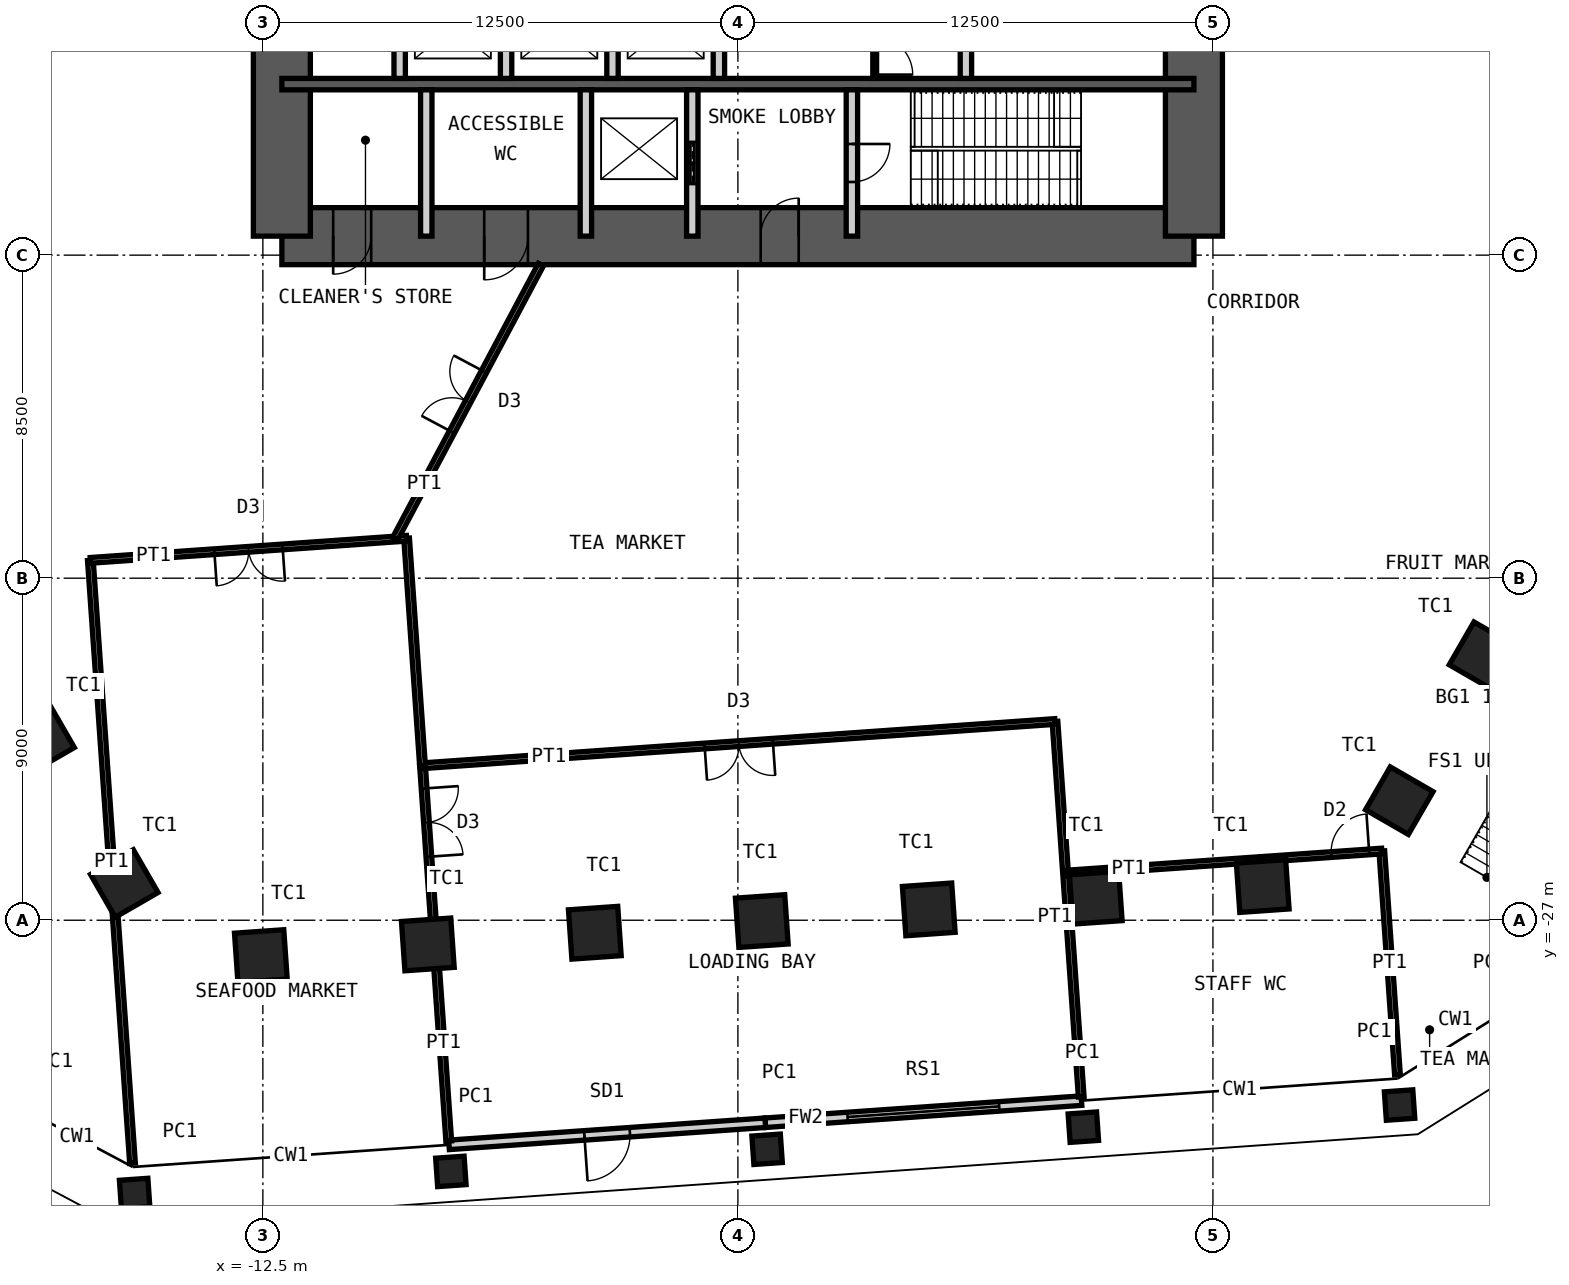
"""IFC4 building model, lengths in metres.
Left out: names, types, materials, properties, quantities, classifications, styles, units other than length and angle.
Written with IfcOpenShell. Run it as: python <this file> out.ifc"""

import sys

from ifc_helpers import new_model, si_unit, direction, frame, frame_2d, origin, origin_2d, place, context, subcontext, project, spatial, rectangle, hollow_rectangle, extrude, element, fill, save


model = new_model("IFC4")
c1 = context("Model", 3, precision=1e-05, world=origin(), true_north=direction((0.0, 1.0)))
c2 = subcontext(c1, "Body", "Model", "MODEL_VIEW")
j1 = project(units=[si_unit("LENGTHUNIT", "METRE"), si_unit("PLANEANGLEUNIT", "RADIAN")], contexts=[c1])
p1 = place(None, origin())
s1 = spatial("IfcSite", under=j1, at=p1, CompositionType="ELEMENT")
p2 = place(p1, origin())
s2 = spatial("IfcBuilding", under=s1, at=p2, CompositionType="ELEMENT")
p3 = place(p2, origin())
s3 = spatial("IfcBuildingStorey", under=s2, at=p3, CompositionType="ELEMENT", Elevation=0.0)
for number, where, z_axis, x_axis in (
    (1, (19.607, -20.04, 0.0), (0.0, 0.0, 1.0), (0.5, 0.866, 0.0)),
    (2, (17.405, -23.854, 0.0), (0.0, 0.0, 1.0), (0.5, 0.866, 0.0)),
    (3, (13.811, -26.1, 0.0), (0.0, 0.0, 1.0), (0.998, 0.07, 0.0)),
    (4, (9.417, -26.407, 0.0), (0.0, 0.0, 1.0), (0.998, 0.07, 0.0)),
    (5, (5.023, -26.715, 0.0), (0.0, 0.0, 1.0), (0.998, 0.07, 0.0)),
    (6, (0.629, -27.022, 0.0), (0.0, 0.0, 1.0), (0.998, 0.07, 0.0)),
    (7, (-3.765, -27.329, 0.0), (0.0, 0.0, 1.0), (0.998, 0.07, 0.0)),
    (8, (-8.159, -27.636, 0.0), (0.0, 0.0, 1.0), (0.998, 0.07, 0.0)),
    (9, (-12.553, -27.944, 0.0), (0.0, 0.0, 1.0), (0.998, 0.07, 0.0)),
    (10, (-16.147, -26.033, 0.0), (0.0, 0.0, 1.0), (0.5, -0.866, 0.0)),
    (11, (-18.349, -22.218, 0.0), (0.0, 0.0, 1.0), (0.5, -0.866, 0.0)),
):
    element("IfcColumn", number, at=place(p3, frame(where, z_axis=z_axis, x_axis=x_axis)), inside=s3, PredefinedType="COLUMN", context=c2, shape_type="SweptSolid", body=[
        extrude(hollow_rectangle(XDim=1.3, YDim=1.3, WallThickness=0.1, at=origin_2d()), origin(), (0.0, 0.0, 1.0), 6.0),
    ])
for number, where, z_axis, x_axis in (
    (12, (17.411, -31.863, 0.0), (0.0, 0.0, 1.0), (0.998, 0.07, 0.0)),
    (13, (9.09, -32.445, 0.0), (0.0, 0.0, 1.0), (0.998, 0.07, 0.0)),
    (14, (0.769, -33.027, 0.0), (0.0, 0.0, 1.0), (0.998, 0.07, 0.0)),
    (15, (-7.553, -33.609, 0.0), (0.0, 0.0, 1.0), (0.998, 0.07, 0.0)),
    (16, (-15.874, -34.191, 0.0), (0.0, 0.0, 1.0), (0.998, 0.07, 0.0)),
):
    element("IfcColumn", number, at=place(p3, frame(where, z_axis=z_axis, x_axis=x_axis)), inside=s3, PredefinedType="COLUMN", context=c2, shape_type="SweptSolid", body=[
        extrude(hollow_rectangle(XDim=0.75, YDim=0.75, WallThickness=0.036, at=origin_2d()), origin(), (0.0, 0.0, 1.0), 6.0),
    ])
p4 = place(p3, frame((-12.0, -9.0, 0.0), z_axis=(0.0, 0.0, 1.0), x_axis=(1.0, 0.0, 0.0)))
e17 = element("IfcWall", 17, at=p4, inside=s3, PredefinedType="SHEAR", context=c2, shape_type="SweptSolid", body=[
    extrude(rectangle(XDim=24.0, YDim=1.5, at=frame_2d((12.0, 0.0))), origin(), (0.0, 0.0, 1.0), 6.0),
])
p5 = place(p4, frame((1.35, 0.0, 0.0)))
e18 = element("IfcOpeningElement", 18, at=p5, cuts=e17, PredefinedType="OPENING", context=c2, shape_type="SweptSolid", body=[
    extrude(rectangle(XDim=1.0, YDim=2.1, at=frame_2d((0.5, 1.05))), frame((0.0, 0.76, 0.0), z_axis=(0.0, -1.0, 0.0), x_axis=(1.0, 0.0, 0.0)), (0.0, 0.0, 1.0), 1.52),
])
p6 = place(p4, frame((5.325, 0.0, 0.0)))
e19 = element("IfcOpeningElement", 19, at=p6, cuts=e17, PredefinedType="OPENING", context=c2, shape_type="SweptSolid", body=[
    extrude(rectangle(XDim=1.15, YDim=2.1, at=frame_2d((0.575, 1.05))), frame((0.0, 0.76, 0.0), z_axis=(0.0, -1.0, 0.0), x_axis=(1.0, 0.0, 0.0)), (0.0, 0.0, 1.0), 1.52),
])
p7 = place(p4, frame((12.6, 0.0, 0.0)))
e20 = element("IfcOpeningElement", 20, at=p7, cuts=e17, PredefinedType="OPENING", context=c2, shape_type="SweptSolid", body=[
    extrude(rectangle(XDim=1.0, YDim=2.1, at=frame_2d((0.5, 1.05))), frame((0.0, 0.76, 0.0), z_axis=(0.0, -1.0, 0.0), x_axis=(1.0, 0.0, 0.0)), (0.0, 0.0, 1.0), 1.52),
])
p8 = place(p3, frame((12.0, -9.0, 0.0), z_axis=(0.0, 0.0, 1.0), x_axis=(0.0, 1.0, 0.0)))
e21 = element("IfcWall", 21, at=p8, inside=s3, PredefinedType="SHEAR", context=c2, shape_type="SweptSolid", body=[
    extrude(rectangle(XDim=18.0, YDim=1.5, at=frame_2d((9.0, 0.0))), origin(), (0.0, 0.0, 1.0), 6.0),
])
p9 = place(p8, frame((8.1, 0.0, 0.0)))
e22 = element("IfcOpeningElement", 22, at=p9, cuts=e21, PredefinedType="OPENING", context=c2, shape_type="SweptSolid", body=[
    extrude(rectangle(XDim=1.8, YDim=2.1, at=frame_2d((0.9, 1.05))), frame((0.0, 0.76, 0.0), z_axis=(0.0, -1.0, 0.0), x_axis=(1.0, 0.0, 0.0)), (0.0, 0.0, 1.0), 1.52),
])
p10 = place(p3, frame((-12.0, -9.0, 0.0), z_axis=(0.0, 0.0, 1.0), x_axis=(0.0, 1.0, 0.0)))
e23 = element("IfcWall", 23, at=p10, inside=s3, PredefinedType="SHEAR", context=c2, shape_type="SweptSolid", body=[
    extrude(rectangle(XDim=18.0, YDim=1.5, at=frame_2d((9.0, 0.0))), origin(), (0.0, 0.0, 1.0), 6.0),
])
p11 = place(p10, frame((8.1, 0.0, 0.0)))
e24 = element("IfcOpeningElement", 24, at=p11, cuts=e23, PredefinedType="OPENING", context=c2, shape_type="SweptSolid", body=[
    extrude(rectangle(XDim=1.8, YDim=2.1, at=frame_2d((0.9, 1.05))), frame((0.0, 0.76, 0.0), z_axis=(0.0, -1.0, 0.0), x_axis=(1.0, 0.0, 0.0)), (0.0, 0.0, 1.0), 1.52),
])
p12 = place(p3, frame((-12.0, -5.0, 0.0), z_axis=(0.0, 0.0, 1.0), x_axis=(1.0, 0.0, 0.0)))
e25 = element("IfcWall", 25, at=p12, inside=s3, PredefinedType="SHEAR", context=c2, shape_type="SweptSolid", body=[
    extrude(rectangle(XDim=24.0, YDim=0.3, at=frame_2d((12.0, 0.0))), origin(), (0.0, 0.0, 1.0), 6.0),
])
for number, where, z_axis, x_axis in (
    (26, (-8.9, -4.85, 0.0), (0.0, 0.0, 1.0), (0.0, 1.0, 0.0)),
    (27, (-6.1, -4.85, 0.0), (0.0, 0.0, 1.0), (0.0, 1.0, 0.0)),
    (28, (-3.3, -4.85, 0.0), (0.0, 0.0, 1.0), (0.0, 1.0, 0.0)),
    (29, (-0.5, -4.85, 0.0), (0.0, 0.0, 1.0), (0.0, 1.0, 0.0)),
    (30, (6.0, -4.85, 0.0), (0.0, 0.0, 1.0), (0.0, 1.0, 0.0)),
):
    element("IfcWall", number, at=place(p3, frame(where, z_axis=z_axis, x_axis=x_axis)), inside=s3, PredefinedType="PARTITIONING", context=c2, shape_type="SweptSolid", body=[
        extrude(rectangle(XDim=2.65, YDim=0.3, at=frame_2d((1.325, 0.0))), origin(), (0.0, 0.0, 1.0), 5.78),
    ])
for number, where, z_axis, x_axis in (
    (31, (-8.2, -9.0, 0.0), (0.0, 0.0, 1.0), (0.0, 1.0, 0.0)),
    (32, (-4.0, -9.0, 0.0), (0.0, 0.0, 1.0), (0.0, 1.0, 0.0)),
):
    element("IfcWall", number, at=place(p3, frame(where, z_axis=z_axis, x_axis=x_axis)), inside=s3, PredefinedType="PARTITIONING", context=c2, shape_type="SweptSolid", body=[
        extrude(rectangle(XDim=3.85, YDim=0.3, at=frame_2d((1.925, 0.0))), origin(), (0.0, 0.0, 1.0), 5.78),
    ])
p13 = place(p3, frame((-1.2, -9.0, 0.0), z_axis=(0.0, 0.0, 1.0), x_axis=(0.0, 1.0, 0.0)))
e33 = element("IfcWall", 33, at=p13, inside=s3, PredefinedType="PARTITIONING", context=c2, shape_type="SweptSolid", body=[
    extrude(rectangle(XDim=3.85, YDim=0.3, at=frame_2d((1.925, 0.0))), origin(), (0.0, 0.0, 1.0), 5.78),
])
p14 = place(p13, frame((1.375, 0.0, 0.0)))
e34 = element("IfcOpeningElement", 34, at=p14, cuts=e33, PredefinedType="OPENING", context=c2, shape_type="SweptSolid", body=[
    extrude(rectangle(XDim=1.1, YDim=2.4, at=frame_2d((0.55, 1.2))), frame((0.0, 0.16, 0.0), z_axis=(0.0, -1.0, 0.0), x_axis=(1.0, 0.0, 0.0)), (0.0, 0.0, 1.0), 0.32),
])
p15 = place(p3, frame((3.0, -9.0, 0.0), z_axis=(0.0, 0.0, 1.0), x_axis=(0.0, 1.0, 0.0)))
e35 = element("IfcWall", 35, at=p15, inside=s3, PredefinedType="PARTITIONING", context=c2, shape_type="SweptSolid", body=[
    extrude(rectangle(XDim=3.85, YDim=0.3, at=frame_2d((1.925, 0.0))), origin(), (0.0, 0.0, 1.0), 5.78),
])
p16 = place(p15, frame((1.425, 0.0, 0.0)))
e36 = element("IfcOpeningElement", 36, at=p16, cuts=e35, PredefinedType="OPENING", context=c2, shape_type="SweptSolid", body=[
    extrude(rectangle(XDim=1.0, YDim=2.1, at=frame_2d((0.5, 1.05))), frame((0.0, 0.16, 0.0), z_axis=(0.0, -1.0, 0.0), x_axis=(1.0, 0.0, 0.0)), (0.0, 0.0, 1.0), 0.32),
])
p17 = place(p3, frame((9.041, -31.747, 0.0), z_axis=(0.0, 0.0, 1.0), x_axis=(-0.99756294098, -0.069772335376, 0.0)))
e37 = element("IfcWall", 37, at=p17, inside=s3, PredefinedType="SOLIDWALL", context=c2, shape_type="SweptSolid", body=[
    extrude(rectangle(XDim=8.342, YDim=0.25, at=frame_2d((4.171, 0.0))), origin(), (0.0, 0.0, 1.0), 5.75),
])
p18 = place(p17, frame((2.171, 0.0, 0.0)))
e38 = element("IfcOpeningElement", 38, at=p18, cuts=e37, PredefinedType="OPENING", context=c2, shape_type="SweptSolid", body=[
    extrude(rectangle(XDim=4.0, YDim=4.5, at=frame_2d((2.0, 2.25))), frame((0.0, 0.135, 0.0), z_axis=(0.0, -1.0, 0.0), x_axis=(1.0, 0.0, 0.0)), (0.0, 0.0, 1.0), 0.27),
])
p19 = place(p3, frame((0.72, -32.329, 0.0), z_axis=(0.0, 0.0, 1.0), x_axis=(-0.997564977604, -0.069743210844, 0.0)))
e39 = element("IfcWall", 39, at=p19, inside=s3, PredefinedType="SOLIDWALL", context=c2, shape_type="SweptSolid", body=[
    extrude(rectangle(XDim=8.342, YDim=0.25, at=frame_2d((4.171, 0.0))), origin(), (0.0, 0.0, 1.0), 5.75),
])
p20 = place(p19, frame((3.571, 0.0, 0.0)))
e40 = element("IfcOpeningElement", 40, at=p20, cuts=e39, PredefinedType="OPENING", context=c2, shape_type="SweptSolid", body=[
    extrude(rectangle(XDim=1.2, YDim=2.1, at=frame_2d((0.6, 1.05))), frame((0.0, 0.135, 0.0), z_axis=(0.0, -1.0, 0.0), x_axis=(1.0, 0.0, 0.0)), (0.0, 0.0, 1.0), 0.27),
])
p21 = place(p3, frame((3.6, -4.85, 0.0), z_axis=(0.0, 0.0, 1.0), x_axis=(0.0, 1.0, 0.0)))
e41 = element("IfcWall", 41, at=p21, inside=s3, PredefinedType="PARTITIONING", context=c2, shape_type="SweptSolid", body=[
    extrude(rectangle(XDim=2.65, YDim=0.1, at=frame_2d((1.325, 0.0))), origin(), (0.0, 0.0, 1.0), 5.78),
])
p22 = place(p21, frame((0.1, 0.0, 0.0)))
e42 = element("IfcOpeningElement", 42, at=p22, cuts=e41, PredefinedType="OPENING", context=c2, shape_type="SweptSolid", body=[
    extrude(rectangle(XDim=1.0, YDim=2.4, at=frame_2d((0.5, 1.2))), frame((0.0, 0.06, 0.0), z_axis=(0.0, -1.0, 0.0), x_axis=(1.0, 0.0, 0.0)), (0.0, 0.0, 1.0), 0.12),
])
p23 = place(p3, frame((9.034, -31.647, 0.0), z_axis=(0.0, 0.0, 1.0), x_axis=(-0.069739801019, 0.99756521599, 0.0)))
e43 = element("IfcWall", 43, at=p23, inside=s3, PredefinedType="PARTITIONING", context=c2, shape_type="SweptSolid", body=[
    extrude(rectangle(XDim=9.9, YDim=0.15, at=frame_2d((4.95, 0.0))), origin(), (0.0, 0.0, 1.0), 4.65),
])
p24 = place(p3, frame((-7.609, -32.811, 0.0), z_axis=(0.0, 0.0, 1.0), x_axis=(-0.069764341483, 0.997563500063, 0.0)))
e44 = element("IfcWall", 44, at=p24, inside=s3, PredefinedType="PARTITIONING", context=c2, shape_type="SweptSolid", body=[
    extrude(rectangle(XDim=9.9, YDim=0.15, at=frame_2d((4.95, 0.0))), origin(), (0.0, 0.0, 1.0), 5.75),
])
p25 = place(p24, frame((7.5, 0.0, 0.0)))
e45 = element("IfcOpeningElement", 45, at=p25, cuts=e44, PredefinedType="OPENING", context=c2, shape_type="SweptSolid", body=[
    extrude(rectangle(XDim=1.8, YDim=2.4, at=frame_2d((0.9, 1.2))), frame((0.0, 0.085, 0.0), z_axis=(0.0, -1.0, 0.0), x_axis=(1.0, 0.0, 0.0)), (0.0, 0.0, 1.0), 0.17),
])
p26 = place(p3, frame((8.344, -21.771, 0.0), z_axis=(0.0, 0.0, 1.0), x_axis=(-0.997563959397, -0.069757773133, 0.0)))
e46 = element("IfcWall", 46, at=p26, inside=s3, PredefinedType="PARTITIONING", context=c2, shape_type="SweptSolid", body=[
    extrude(rectangle(XDim=16.684, YDim=0.15, at=frame_2d((8.342, 0.0))), origin(), (0.0, 0.0, 1.0), 5.75),
])
p27 = place(p26, frame((7.442, 0.0, 0.0)))
e47 = element("IfcOpeningElement", 47, at=p27, cuts=e46, PredefinedType="OPENING", context=c2, shape_type="SweptSolid", body=[
    extrude(rectangle(XDim=1.8, YDim=2.4, at=frame_2d((0.9, 1.2))), frame((0.0, 0.085, 0.0), z_axis=(0.0, -1.0, 0.0), x_axis=(1.0, 0.0, 0.0)), (0.0, 0.0, 1.0), 0.17),
])
p28 = place(p3, frame((17.356, -31.065, 0.0), z_axis=(0.0, 0.0, 1.0), x_axis=(-0.069767771051, 0.997563260211, 0.0)))
e48 = element("IfcWall", 48, at=p28, inside=s3, PredefinedType="PARTITIONING", context=c2, shape_type="SweptSolid", body=[
    extrude(rectangle(XDim=5.9, YDim=0.15, at=frame_2d((2.95, 0.0))), origin(), (0.0, 0.0, 1.0), 5.75),
])
p29 = place(p3, frame((16.944, -25.179, 0.0), z_axis=(0.0, 0.0, 1.0), x_axis=(-0.997564977604, -0.069743210844, 0.0)))
e49 = element("IfcWall", 49, at=p29, inside=s3, PredefinedType="PARTITIONING", context=c2, shape_type="SweptSolid", body=[
    extrude(rectangle(XDim=8.342, YDim=0.15, at=frame_2d((4.171, 0.0))), origin(), (0.0, 0.0, 1.0), 5.75),
])
p30 = place(p29, frame((0.334, 0.0, 0.0)))
e50 = element("IfcOpeningElement", 50, at=p30, cuts=e49, PredefinedType="OPENING", context=c2, shape_type="SweptSolid", body=[
    extrude(rectangle(XDim=1.0, YDim=2.4, at=frame_2d((0.5, 1.2))), frame((0.0, 0.085, 0.0), z_axis=(0.0, -1.0, 0.0), x_axis=(1.0, 0.0, 0.0)), (0.0, 0.0, 1.0), 0.17),
])
p31 = place(p3, frame((-8.299, -22.935, 0.0), z_axis=(0.0, 0.0, 1.0), x_axis=(-0.069743284499, 0.997564972454, 0.0)))
e51 = element("IfcWall", 51, at=p31, inside=s3, PredefinedType="PARTITIONING", context=c2, shape_type="SweptSolid", body=[
    extrude(rectangle(XDim=6.0, YDim=0.15, at=frame_2d((3.0, 0.0))), origin(), (0.0, 0.0, 1.0), 5.75),
])
p32 = place(p3, frame((-15.93, -33.393, 0.0), z_axis=(0.0, 0.0, 1.0), x_axis=(-0.069756395536, 0.997564055729, 0.0)))
e52 = element("IfcWall", 52, at=p32, inside=s3, PredefinedType="PARTITIONING", context=c2, shape_type="SweptSolid", body=[
    extrude(rectangle(XDim=15.9, YDim=0.15, at=frame_2d((7.95, 0.0))), origin(), (0.0, 0.0, 1.0), 5.75),
])
p33 = place(p3, frame((-8.718, -16.949, 0.0), z_axis=(0.0, 0.0, 1.0), x_axis=(-0.997564977604, -0.069743210844, 0.0)))
e53 = element("IfcWall", 53, at=p33, inside=s3, PredefinedType="PARTITIONING", context=c2, shape_type="SweptSolid", body=[
    extrude(rectangle(XDim=8.342, YDim=0.15, at=frame_2d((4.171, 0.0))), origin(), (0.0, 0.0, 1.0), 5.75),
])
p34 = place(p33, frame((3.271, 0.0, 0.0)))
e54 = element("IfcOpeningElement", 54, at=p34, cuts=e53, PredefinedType="OPENING", context=c2, shape_type="SweptSolid", body=[
    extrude(rectangle(XDim=1.8, YDim=2.4, at=frame_2d((0.9, 1.2))), frame((0.0, 0.085, 0.0), z_axis=(0.0, -1.0, 0.0), x_axis=(1.0, 0.0, 0.0)), (0.0, 0.0, 1.0), 0.17),
])
p35 = place(p3, frame((-5.184, -9.75, 0.0), z_axis=(0.0, 0.0, 1.0), x_axis=(-0.469479196043, -0.882943534142, 0.0)))
e55 = element("IfcWall", 55, at=p35, inside=s3, PredefinedType="PARTITIONING", context=c2, shape_type="SweptSolid", body=[
    extrude(rectangle(XDim=8.172, YDim=0.15, at=frame_2d((4.086, 0.0))), origin(), (0.0, 0.0, 1.0), 5.75),
])
p36 = place(p35, frame((3.186, 0.0, 0.0)))
e56 = element("IfcOpeningElement", 56, at=p36, cuts=e55, PredefinedType="OPENING", context=c2, shape_type="SweptSolid", body=[
    extrude(rectangle(XDim=1.8, YDim=2.4, at=frame_2d((0.9, 1.2))), frame((0.0, 0.085, 0.0), z_axis=(0.0, -1.0, 0.0), x_axis=(1.0, 0.0, 0.0)), (0.0, 0.0, 1.0), 0.17),
])
p37 = place(p18, origin())
e57 = element("IfcDoor", 57, at=p37, inside=s3, OperationType="ROLLINGUP", PredefinedType="DOOR", context=c2, shape_type="SweptSolid", body=[
    extrude(rectangle(XDim=4.0, YDim=4.5, at=frame_2d((2.0, 2.25))), frame((0.0, 0.025, 0.0), z_axis=(0.0, -1.0, 0.0), x_axis=(1.0, 0.0, 0.0)), (0.0, 0.0, 1.0), 0.05),
])
fill(e38, e57)
p38 = place(p20, origin())
e58 = element("IfcDoor", 58, at=p38, inside=s3, OperationType="SINGLE_SWING_LEFT", PredefinedType="DOOR", context=c2, shape_type="SweptSolid", body=[
    extrude(rectangle(XDim=1.2, YDim=2.1, at=frame_2d((0.6, 1.05))), frame((0.0, 0.025, 0.0), z_axis=(0.0, -1.0, 0.0), x_axis=(1.0, 0.0, 0.0)), (0.0, 0.0, 1.0), 0.05),
])
fill(e40, e58)
p39 = place(p5, origin())
e59 = element("IfcDoor", 59, at=p39, inside=s3, OperationType="SINGLE_SWING_LEFT", PredefinedType="DOOR", context=c2, shape_type="SweptSolid", body=[
    extrude(rectangle(XDim=1.0, YDim=2.1, at=frame_2d((0.5, 1.05))), frame((0.0, 0.025, 0.0), z_axis=(0.0, -1.0, 0.0), x_axis=(1.0, 0.0, 0.0)), (0.0, 0.0, 1.0), 0.05),
])
fill(e18, e59)
p40 = place(p6, origin())
e60 = element("IfcDoor", 60, at=p40, inside=s3, OperationType="SINGLE_SWING_LEFT", PredefinedType="DOOR", context=c2, shape_type="SweptSolid", body=[
    extrude(rectangle(XDim=1.15, YDim=2.1, at=frame_2d((0.575, 1.05))), frame((0.0, 0.025, 0.0), z_axis=(0.0, -1.0, 0.0), x_axis=(1.0, 0.0, 0.0)), (0.0, 0.0, 1.0), 0.05),
])
fill(e19, e60)
p41 = place(p7, origin())
e61 = element("IfcDoor", 61, at=p41, inside=s3, OperationType="SINGLE_SWING_LEFT", PredefinedType="DOOR", context=c2, shape_type="SweptSolid", body=[
    extrude(rectangle(XDim=1.0, YDim=2.1, at=frame_2d((0.5, 1.05))), frame((0.0, 0.025, 0.0), z_axis=(0.0, -1.0, 0.0), x_axis=(1.0, 0.0, 0.0)), (0.0, 0.0, 1.0), 0.05),
])
fill(e20, e61)
p42 = place(p16, origin())
e62 = element("IfcDoor", 62, at=p42, inside=s3, OperationType="SINGLE_SWING_RIGHT", PredefinedType="DOOR", context=c2, shape_type="SweptSolid", body=[
    extrude(rectangle(XDim=1.0, YDim=2.1, at=frame_2d((0.5, 1.05))), frame((0.0, 0.025, 0.0), z_axis=(0.0, -1.0, 0.0), x_axis=(1.0, 0.0, 0.0)), (0.0, 0.0, 1.0), 0.05),
])
fill(e36, e62)
p43 = place(p14, origin())
e63 = element("IfcDoor", 63, at=p43, inside=s3, OperationType="DOUBLE_DOOR_SLIDING", PredefinedType="DOOR", context=c2, shape_type="SweptSolid", body=[
    extrude(rectangle(XDim=1.1, YDim=2.4, at=frame_2d((0.55, 1.2))), frame((0.0, 0.025, 0.0), z_axis=(0.0, -1.0, 0.0), x_axis=(1.0, 0.0, 0.0)), (0.0, 0.0, 1.0), 0.05),
])
fill(e34, e63)
p44 = place(p22, origin())
e64 = element("IfcDoor", 64, at=p44, inside=s3, OperationType="SINGLE_SWING_LEFT", PredefinedType="DOOR", context=c2, shape_type="SweptSolid", body=[
    extrude(rectangle(XDim=1.0, YDim=2.4, at=frame_2d((0.5, 1.2))), frame((0.0, 0.025, 0.0), z_axis=(0.0, -1.0, 0.0), x_axis=(1.0, 0.0, 0.0)), (0.0, 0.0, 1.0), 0.05),
])
fill(e42, e64)
p45 = place(p25, origin())
e65 = element("IfcDoor", 65, at=p45, inside=s3, OperationType="DOUBLE_DOOR_DOUBLE_SWING", PredefinedType="DOOR", context=c2, shape_type="SweptSolid", body=[
    extrude(rectangle(XDim=1.8, YDim=2.4, at=frame_2d((0.9, 1.2))), frame((0.0, 0.025, 0.0), z_axis=(0.0, -1.0, 0.0), x_axis=(1.0, 0.0, 0.0)), (0.0, 0.0, 1.0), 0.05),
])
fill(e45, e65)
p46 = place(p27, origin())
e66 = element("IfcDoor", 66, at=p46, inside=s3, OperationType="DOUBLE_DOOR_DOUBLE_SWING", PredefinedType="DOOR", context=c2, shape_type="SweptSolid", body=[
    extrude(rectangle(XDim=1.8, YDim=2.4, at=frame_2d((0.9, 1.2))), frame((0.0, 0.025, 0.0), z_axis=(0.0, -1.0, 0.0), x_axis=(1.0, 0.0, 0.0)), (0.0, 0.0, 1.0), 0.05),
])
fill(e47, e66)
p47 = place(p30, origin())
e67 = element("IfcDoor", 67, at=p47, inside=s3, OperationType="SINGLE_SWING_LEFT", PredefinedType="DOOR", context=c2, shape_type="SweptSolid", body=[
    extrude(rectangle(XDim=1.0, YDim=2.4, at=frame_2d((0.5, 1.2))), frame((0.0, 0.025, 0.0), z_axis=(0.0, -1.0, 0.0), x_axis=(1.0, 0.0, 0.0)), (0.0, 0.0, 1.0), 0.05),
])
fill(e50, e67)
p48 = place(p34, origin())
e68 = element("IfcDoor", 68, at=p48, inside=s3, OperationType="DOUBLE_DOOR_DOUBLE_SWING", PredefinedType="DOOR", context=c2, shape_type="SweptSolid", body=[
    extrude(rectangle(XDim=1.8, YDim=2.4, at=frame_2d((0.9, 1.2))), frame((0.0, 0.025, 0.0), z_axis=(0.0, -1.0, 0.0), x_axis=(1.0, 0.0, 0.0)), (0.0, 0.0, 1.0), 0.05),
])
fill(e54, e68)
p49 = place(p36, origin())
e69 = element("IfcDoor", 69, at=p49, inside=s3, OperationType="DOUBLE_DOOR_DOUBLE_SWING", PredefinedType="DOOR", context=c2, shape_type="SweptSolid", body=[
    extrude(rectangle(XDim=1.8, YDim=2.4, at=frame_2d((0.9, 1.2))), frame((0.0, 0.025, 0.0), z_axis=(0.0, -1.0, 0.0), x_axis=(1.0, 0.0, 0.0)), (0.0, 0.0, 1.0), 0.05),
])
fill(e56, e69)
save(model, sys.argv[1])
